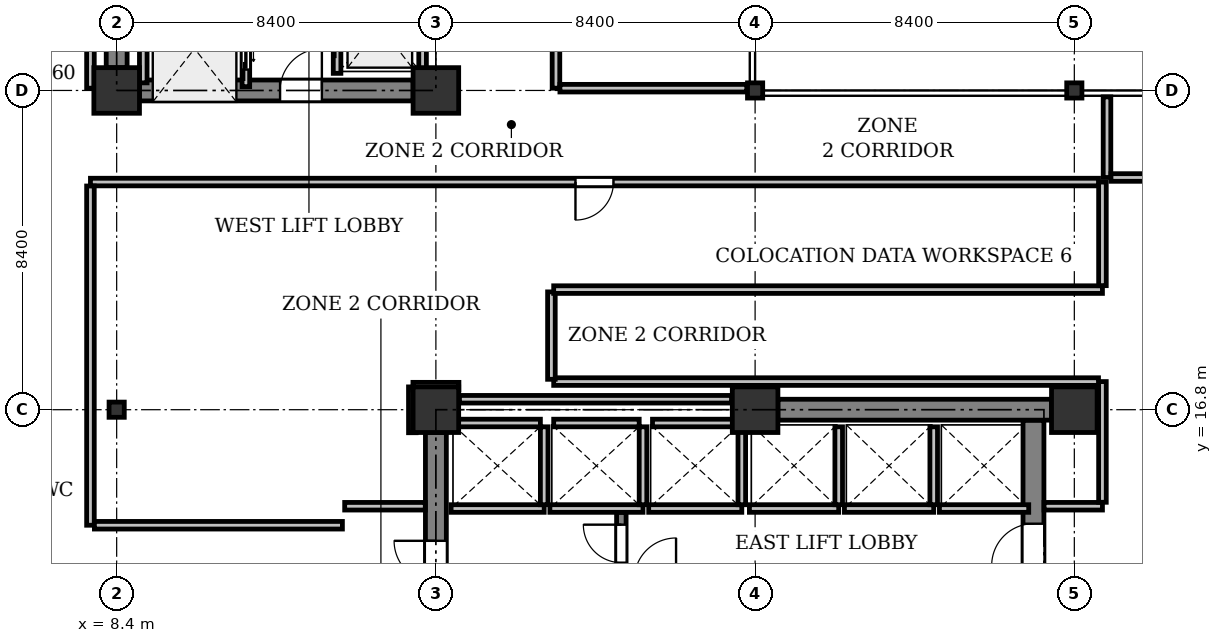
"""IFC4 building model, lengths in metres.
Left out: names, types, materials, properties, quantities, classifications, styles, units other than length and angle.
Written with IfcOpenShell. Run it as: python <this file> out.ifc"""

import sys

from ifc_helpers import new_model, si_unit, direction, frame, frame_2d, origin, origin_2d, place, context, subcontext, project, spatial, rectangle, i_section, extrude, element, fill, save


model = new_model("IFC4")
c1 = context("Model", 3, precision=1e-05, world=origin(), true_north=direction((0.0, 1.0)))
c2 = subcontext(c1, "Body", "Model", "MODEL_VIEW")
j1 = project(units=[si_unit("LENGTHUNIT", "METRE"), si_unit("PLANEANGLEUNIT", "RADIAN")], contexts=[c1])
p1 = place(None, origin())
s1 = spatial("IfcSite", under=j1, at=p1, CompositionType="ELEMENT")
p2 = place(p1, origin())
s2 = spatial("IfcBuilding", under=s1, at=p2, CompositionType="ELEMENT")
p3 = place(p2, frame((0.0, 0.0, 96.7)))
s3 = spatial("IfcBuildingStorey", under=s2, at=p3, CompositionType="ELEMENT", Elevation=96.7)
p4 = place(p3, frame((8.4, 16.8, 0.0), z_axis=(0.0, 0.0, 1.0), x_axis=(1.0, 0.0, 0.0)))
e1 = element("IfcColumn", 1, at=p4, inside=s3, PredefinedType="COLUMN", context=c2, shape_type="SweptSolid", body=[
    extrude(i_section(OverallWidth=0.4, OverallDepth=0.4, WebThickness=0.025, FlangeThickness=0.04, at=origin_2d()), origin(), (0.0, 0.0, 1.0), 4.1),
])
for number, where, z_axis, x_axis in (
    (2, (8.4, 25.2, 0.0), (0.0, 0.0, 1.0), (1.0, 0.0, 0.0)),
    (3, (16.8, 16.8, 0.0), (0.0, 0.0, 1.0), (1.0, 0.0, 0.0)),
    (4, (16.8, 25.2, 0.0), (0.0, 0.0, 1.0), (1.0, 0.0, 0.0)),
    (5, (25.2, 16.8, 0.0), (0.0, 0.0, 1.0), (1.0, 0.0, 0.0)),
):
    element("IfcColumn", number, at=place(p3, frame(where, z_axis=z_axis, x_axis=x_axis)), inside=s3, PredefinedType="COLUMN", context=c2, shape_type="SweptSolid", body=[
        extrude(rectangle(XDim=1.2, YDim=1.2, at=origin_2d()), origin(), (0.0, 0.0, 1.0), 4.1),
    ])
p5 = place(p3, frame((25.2, 25.2, 0.0), z_axis=(0.0, 0.0, 1.0), x_axis=(1.0, 0.0, 0.0)))
e6 = element("IfcColumn", 6, at=p5, inside=s3, PredefinedType="COLUMN", context=c2, shape_type="SweptSolid", body=[
    extrude(i_section(OverallWidth=0.4, OverallDepth=0.4, WebThickness=0.025, FlangeThickness=0.04, at=origin_2d()), origin(), (0.0, 0.0, 1.0), 4.1),
])
p6 = place(p3, frame((33.6, 16.8, 0.0), z_axis=(0.0, 0.0, 1.0), x_axis=(1.0, 0.0, 0.0)))
e7 = element("IfcColumn", 7, at=p6, inside=s3, PredefinedType="COLUMN", context=c2, shape_type="SweptSolid", body=[
    extrude(rectangle(XDim=1.2, YDim=1.2, at=origin_2d()), origin(), (0.0, 0.0, 1.0), 4.1),
])
p7 = place(p3, frame((33.6, 25.2, 0.0), z_axis=(0.0, 0.0, 1.0), x_axis=(1.0, 0.0, 0.0)))
e8 = element("IfcColumn", 8, at=p7, inside=s3, PredefinedType="COLUMN", context=c2, shape_type="SweptSolid", body=[
    extrude(i_section(OverallWidth=0.4, OverallDepth=0.4, WebThickness=0.025, FlangeThickness=0.04, at=origin_2d()), origin(), (0.0, 0.0, 1.0), 4.1),
])
p8 = place(p3, frame((8.4, 25.8, 0.0), z_axis=(0.0, 0.0, 1.0), x_axis=(0.0, 1.0, 0.0)))
e9 = element("IfcWall", 9, at=p8, inside=s3, PredefinedType="SHEAR", context=c2, shape_type="SweptSolid", body=[
    extrude(rectangle(XDim=7.2, YDim=0.55, at=frame_2d((3.6, 0.0))), origin(), (0.0, 0.0, 1.0), 3.825),
])
p9 = place(p3, frame((9.0, 25.2, 0.0), z_axis=(0.0, 0.0, 1.0), x_axis=(1.0, 0.0, 0.0)))
e10 = element("IfcWall", 10, at=p9, inside=s3, PredefinedType="SHEAR", context=c2, shape_type="SweptSolid", body=[
    extrude(rectangle(XDim=7.2, YDim=0.55, at=frame_2d((3.6, 0.0))), origin(), (0.0, 0.0, 1.0), 3.825),
])
p10 = place(p9, frame((3.7, 0.0, 0.0)))
e11 = element("IfcOpeningElement", 11, at=p10, cuts=e10, PredefinedType="OPENING", context=c2, shape_type="SweptSolid", body=[
    extrude(rectangle(XDim=1.1, YDim=2.15, at=frame_2d((0.55, 1.075))), frame((0.0, 0.285, 0.0), z_axis=(0.0, -1.0, 0.0), x_axis=(1.0, 0.0, 0.0)), (0.0, 0.0, 1.0), 0.57),
])
p11 = place(p3, frame((32.525, 8.675, 0.0), z_axis=(0.0, 0.0, 1.0), x_axis=(0.0, 1.0, 0.0)))
e12 = element("IfcWall", 12, at=p11, inside=s3, PredefinedType="SHEAR", context=c2, shape_type="SweptSolid", body=[
    extrude(rectangle(XDim=7.85, YDim=0.55, at=frame_2d((3.925, 0.0))), origin(), (0.0, 0.0, 1.0), 3.825),
])
p12 = place(p11, frame((4.025, 0.0, 0.0)))
e13 = element("IfcOpeningElement", 13, at=p12, cuts=e12, PredefinedType="OPENING", context=c2, shape_type="SweptSolid", body=[
    extrude(rectangle(XDim=1.1, YDim=2.15, at=frame_2d((0.55, 1.075))), frame((0.0, 0.285, 0.0), z_axis=(0.0, -1.0, 0.0), x_axis=(1.0, 0.0, 0.0)), (0.0, 0.0, 1.0), 0.57),
])
p13 = place(p3, frame((16.8, 9.0, 0.0), z_axis=(0.0, 0.0, 1.0), x_axis=(0.0, 1.0, 0.0)))
e14 = element("IfcWall", 14, at=p13, inside=s3, PredefinedType="SHEAR", context=c2, shape_type="SweptSolid", body=[
    extrude(rectangle(XDim=7.2, YDim=0.55, at=frame_2d((3.6, 0.0))), origin(), (0.0, 0.0, 1.0), 3.825),
])
p14 = place(p13, frame((3.25, 0.0, 0.0)))
e15 = element("IfcOpeningElement", 15, at=p14, cuts=e14, PredefinedType="OPENING", context=c2, shape_type="SweptSolid", body=[
    extrude(rectangle(XDim=1.1, YDim=2.15, at=frame_2d((0.55, 1.075))), frame((0.0, 0.285, 0.0), z_axis=(0.0, -1.0, 0.0), x_axis=(1.0, 0.0, 0.0)), (0.0, 0.0, 1.0), 0.57),
])
p15 = place(p3, frame((25.8, 16.8, 0.0), z_axis=(0.0, 0.0, 1.0), x_axis=(1.0, 0.0, 0.0)))
e16 = element("IfcWall", 16, at=p15, inside=s3, PredefinedType="SHEAR", context=c2, shape_type="SweptSolid", body=[
    extrude(rectangle(XDim=7.2, YDim=0.55, at=frame_2d((3.6, 0.0))), origin(), (0.0, 0.0, 1.0), 3.825),
])
p16 = place(p3, frame((21.68, 12.45, 0.0), z_axis=(0.0, 0.0, 1.0), x_axis=(0.0, 1.0, 0.0)))
e17 = element("IfcWall", 17, at=p16, inside=s3, PredefinedType="SHEAR", context=c2, shape_type="SweptSolid", body=[
    extrude(rectangle(XDim=1.65, YDim=0.25, at=frame_2d((0.825, 0.0))), origin(), (0.0, 0.0, 1.0), 3.825),
])
p17 = place(p16, frame((0.325, 0.0, 0.0)))
e18 = element("IfcOpeningElement", 18, at=p17, cuts=e17, PredefinedType="OPENING", context=c2, shape_type="SweptSolid", body=[
    extrude(rectangle(XDim=1.0, YDim=2.15, at=frame_2d((0.5, 1.075))), frame((0.0, 0.135, 0.0), z_axis=(0.0, -1.0, 0.0), x_axis=(1.0, 0.0, 0.0)), (0.0, 0.0, 1.0), 0.27),
])
p18 = place(p3, frame((11.8, 25.3, 0.0), z_axis=(0.0, 0.0, 1.0), x_axis=(0.0, 1.0, 0.0)))
e19 = element("IfcWall", 19, at=p18, inside=s3, PredefinedType="PARTITIONING", context=c2, shape_type="SweptSolid", body=[
    extrude(rectangle(XDim=2.0, YDim=0.2, at=frame_2d((1.0, 0.0))), origin(), (0.0, 0.0, 1.0), 3.825),
])
p19 = place(p18, frame((0.45, 0.0, 0.0)))
e20 = element("IfcOpeningElement", 20, at=p19, cuts=e19, PredefinedType="OPENING", context=c2, shape_type="SweptSolid", body=[
    extrude(rectangle(XDim=1.1, YDim=2.2, at=frame_2d((0.55, 1.1))), frame((0.0, 0.11, 0.0), z_axis=(0.0, -1.0, 0.0), x_axis=(1.0, 0.0, 0.0)), (0.0, 0.0, 1.0), 0.22),
])
p20 = place(p3, frame((9.1, 25.4, 0.0), z_axis=(0.0, 0.0, 1.0), x_axis=(0.0, 1.0, 0.0)))
e21 = element("IfcWall", 21, at=p20, inside=s3, PredefinedType="PARTITIONING", context=c2, shape_type="SweptSolid", body=[
    extrude(rectangle(XDim=1.8, YDim=0.2, at=frame_2d((0.9, 0.0))), origin(), (0.0, 0.0, 1.0), 3.825),
])
p21 = place(p3, frame((14.2, 25.65, 0.0), z_axis=(0.0, 0.0, 1.0), x_axis=(0.0, 1.0, 0.0)))
e22 = element("IfcWall", 22, at=p21, inside=s3, PredefinedType="PARTITIONING", context=c2, shape_type="SweptSolid", body=[
    extrude(rectangle(XDim=2.5, YDim=0.2, at=frame_2d((1.25, 0.0))), origin(), (0.0, 0.0, 1.0), 3.825),
])
p22 = place(p21, frame((0.7, 0.0, 0.0)))
e23 = element("IfcOpeningElement", 23, at=p22, cuts=e22, PredefinedType="OPENING", context=c2, shape_type="SweptSolid", body=[
    extrude(rectangle(XDim=1.1, YDim=2.2, at=frame_2d((0.55, 1.1))), frame((0.0, 0.11, 0.0), z_axis=(0.0, -1.0, 0.0), x_axis=(1.0, 0.0, 0.0)), (0.0, 0.0, 1.0), 0.22),
])
p23 = place(p3, frame((16.45, 25.75, 0.0), z_axis=(0.0, 0.0, 1.0), x_axis=(0.0, 1.0, 0.0)))
e24 = element("IfcWall", 24, at=p23, inside=s3, PredefinedType="PARTITIONING", context=c2, shape_type="SweptSolid", body=[
    extrude(rectangle(XDim=2.3, YDim=0.2, at=frame_2d((1.15, 0.0))), origin(), (0.0, 0.0, 1.0), 3.825),
])
p24 = place(p3, frame((17.2, 14.2, 0.0), z_axis=(0.0, 0.0, 1.0), x_axis=(1.0, 0.0, 0.0)))
e25 = element("IfcWall", 25, at=p24, inside=s3, PredefinedType="PARTITIONING", context=c2, shape_type="SweptSolid", body=[
    extrude(rectangle(XDim=2.45, YDim=0.2, at=frame_2d((1.225, 0.0))), origin(), (0.0, 0.0, 1.0), 3.825),
])
p25 = place(p3, frame((19.65, 14.3, 0.0), z_axis=(0.0, 0.0, 1.0), x_axis=(0.0, 1.0, 0.0)))
e26 = element("IfcWall", 26, at=p25, inside=s3, PredefinedType="PARTITIONING", context=c2, shape_type="SweptSolid", body=[
    extrude(rectangle(XDim=2.05, YDim=0.2, at=frame_2d((1.025, 0.0))), origin(), (0.0, 0.0, 1.0), 3.825),
])
p26 = place(p3, frame((17.3, 16.45, 0.0), z_axis=(0.0, 0.0, 1.0), x_axis=(1.0, 0.0, 0.0)))
e27 = element("IfcWall", 27, at=p26, inside=s3, PredefinedType="PARTITIONING", context=c2, shape_type="SweptSolid", body=[
    extrude(rectangle(XDim=2.25, YDim=0.2, at=frame_2d((1.125, 0.0))), origin(), (0.0, 0.0, 1.0), 3.825),
])
p27 = place(p3, frame((19.8, 14.2, 0.0), z_axis=(0.0, 0.0, 1.0), x_axis=(1.0, 0.0, 0.0)))
e28 = element("IfcWall", 28, at=p27, inside=s3, PredefinedType="PARTITIONING", context=c2, shape_type="SweptSolid", body=[
    extrude(rectangle(XDim=2.45, YDim=0.2, at=frame_2d((1.225, 0.0))), origin(), (0.0, 0.0, 1.0), 3.825),
])
p28 = place(p3, frame((22.25, 14.3, 0.0), z_axis=(0.0, 0.0, 1.0), x_axis=(0.0, 1.0, 0.0)))
e29 = element("IfcWall", 29, at=p28, inside=s3, PredefinedType="PARTITIONING", context=c2, shape_type="SweptSolid", body=[
    extrude(rectangle(XDim=2.05, YDim=0.2, at=frame_2d((1.025, 0.0))), origin(), (0.0, 0.0, 1.0), 3.825),
])
p29 = place(p3, frame((19.9, 16.45, 0.0), z_axis=(0.0, 0.0, 1.0), x_axis=(1.0, 0.0, 0.0)))
e30 = element("IfcWall", 30, at=p29, inside=s3, PredefinedType="PARTITIONING", context=c2, shape_type="SweptSolid", body=[
    extrude(rectangle(XDim=2.25, YDim=0.2, at=frame_2d((1.125, 0.0))), origin(), (0.0, 0.0, 1.0), 3.825),
])
p30 = place(p3, frame((22.4, 14.2, 0.0), z_axis=(0.0, 0.0, 1.0), x_axis=(1.0, 0.0, 0.0)))
e31 = element("IfcWall", 31, at=p30, inside=s3, PredefinedType="PARTITIONING", context=c2, shape_type="SweptSolid", body=[
    extrude(rectangle(XDim=2.45, YDim=0.2, at=frame_2d((1.225, 0.0))), origin(), (0.0, 0.0, 1.0), 3.825),
])
p31 = place(p3, frame((24.85, 14.3, 0.0), z_axis=(0.0, 0.0, 1.0), x_axis=(0.0, 1.0, 0.0)))
e32 = element("IfcWall", 32, at=p31, inside=s3, PredefinedType="PARTITIONING", context=c2, shape_type="SweptSolid", body=[
    extrude(rectangle(XDim=2.05, YDim=0.2, at=frame_2d((1.025, 0.0))), origin(), (0.0, 0.0, 1.0), 3.825),
])
p32 = place(p3, frame((22.5, 16.45, 0.0), z_axis=(0.0, 0.0, 1.0), x_axis=(1.0, 0.0, 0.0)))
e33 = element("IfcWall", 33, at=p32, inside=s3, PredefinedType="PARTITIONING", context=c2, shape_type="SweptSolid", body=[
    extrude(rectangle(XDim=2.25, YDim=0.2, at=frame_2d((1.125, 0.0))), origin(), (0.0, 0.0, 1.0), 3.825),
])
p33 = place(p3, frame((25.05, 14.2, 0.0), z_axis=(0.0, 0.0, 1.0), x_axis=(1.0, 0.0, 0.0)))
e34 = element("IfcWall", 34, at=p33, inside=s3, PredefinedType="PARTITIONING", context=c2, shape_type="SweptSolid", body=[
    extrude(rectangle(XDim=2.35, YDim=0.2, at=frame_2d((1.175, 0.0))), origin(), (0.0, 0.0, 1.0), 3.825),
])
p34 = place(p3, frame((27.4, 14.3, 0.0), z_axis=(0.0, 0.0, 1.0), x_axis=(0.0, 1.0, 0.0)))
e35 = element("IfcWall", 35, at=p34, inside=s3, PredefinedType="PARTITIONING", context=c2, shape_type="SweptSolid", body=[
    extrude(rectangle(XDim=2.05, YDim=0.2, at=frame_2d((1.025, 0.0))), origin(), (0.0, 0.0, 1.0), 3.825),
])
p35 = place(p3, frame((27.55, 14.2, 0.0), z_axis=(0.0, 0.0, 1.0), x_axis=(1.0, 0.0, 0.0)))
e36 = element("IfcWall", 36, at=p35, inside=s3, PredefinedType="PARTITIONING", context=c2, shape_type="SweptSolid", body=[
    extrude(rectangle(XDim=2.35, YDim=0.2, at=frame_2d((1.175, 0.0))), origin(), (0.0, 0.0, 1.0), 3.825),
])
p36 = place(p3, frame((29.9, 14.3, 0.0), z_axis=(0.0, 0.0, 1.0), x_axis=(0.0, 1.0, 0.0)))
e37 = element("IfcWall", 37, at=p36, inside=s3, PredefinedType="PARTITIONING", context=c2, shape_type="SweptSolid", body=[
    extrude(rectangle(XDim=2.05, YDim=0.2, at=frame_2d((1.025, 0.0))), origin(), (0.0, 0.0, 1.0), 3.825),
])
p37 = place(p3, frame((30.05, 14.2, 0.0), z_axis=(0.0, 0.0, 1.0), x_axis=(1.0, 0.0, 0.0)))
e38 = element("IfcWall", 38, at=p37, inside=s3, PredefinedType="PARTITIONING", context=c2, shape_type="SweptSolid", body=[
    extrude(rectangle(XDim=2.35, YDim=0.2, at=frame_2d((1.175, 0.0))), origin(), (0.0, 0.0, 1.0), 3.825),
])
p38 = place(p3, frame((32.804, 14.26, 0.0), z_axis=(0.0, 0.0, 1.0), x_axis=(1.0, 0.0, 0.0)))
e39 = element("IfcWall", 39, at=p38, inside=s3, PredefinedType="PARTITIONING", context=c2, shape_type="SweptSolid", body=[
    extrude(rectangle(XDim=1.536, YDim=0.2, at=frame_2d((0.768, 0.0))), origin(), (0.0, 0.0, 1.0), 3.297),
])
p39 = place(p3, frame((34.34, 14.364, 0.0), z_axis=(0.0, 0.0, 1.0), x_axis=(0.0, 1.0, 0.0)))
e40 = element("IfcWall", 40, at=p39, inside=s3, PredefinedType="PARTITIONING", context=c2, shape_type="SweptSolid", body=[
    extrude(rectangle(XDim=3.176, YDim=0.2, at=frame_2d((1.588, 0.0))), origin(), (0.0, 0.0, 1.0), 3.292),
])
p40 = place(p3, frame((34.236, 17.54, 0.0), z_axis=(0.0, 0.0, 1.0), x_axis=(-1.0, 0.0, 0.0)))
e41 = element("IfcWall", 41, at=p40, inside=s3, PredefinedType="PARTITIONING", context=c2, shape_type="SweptSolid", body=[
    extrude(rectangle(XDim=14.336, YDim=0.2, at=frame_2d((7.168, 0.0))), origin(), (0.0, 0.0, 1.0), 3.297),
])
p41 = place(p3, frame((19.84, 17.6, 0.0), z_axis=(0.0, 0.0, 1.0), x_axis=(0.0, 1.0, 0.0)))
e42 = element("IfcWall", 42, at=p41, inside=s3, PredefinedType="PARTITIONING", context=c2, shape_type="SweptSolid", body=[
    extrude(rectangle(XDim=2.3, YDim=0.2, at=frame_2d((1.15, 0.0))), origin(), (0.0, 0.0, 1.0), 3.825),
])
p42 = place(p3, frame((19.9, 19.96, 0.0), z_axis=(0.0, 0.0, 1.0), x_axis=(1.0, 0.0, 0.0)))
e43 = element("IfcWall", 43, at=p42, inside=s3, PredefinedType="PARTITIONING", context=c2, shape_type="SweptSolid", body=[
    extrude(rectangle(XDim=14.44, YDim=0.2, at=frame_2d((7.22, 0.0))), origin(), (0.0, 0.0, 1.0), 3.297),
])
p43 = place(p3, frame((34.34, 20.064, 0.0), z_axis=(0.0, 0.0, 1.0), x_axis=(0.0, 1.0, 0.0)))
e44 = element("IfcWall", 44, at=p43, inside=s3, PredefinedType="PARTITIONING", context=c2, shape_type="SweptSolid", body=[
    extrude(rectangle(XDim=2.726, YDim=0.2, at=frame_2d((1.363, 0.0))), origin(), (0.0, 0.0, 1.0), 3.825),
])
p44 = place(p3, frame((34.236, 22.79, 0.0), z_axis=(0.0, 0.0, 1.0), x_axis=(-1.0, 0.0, 0.0)))
e45 = element("IfcWall", 45, at=p44, inside=s3, PredefinedType="PARTITIONING", context=c2, shape_type="SweptSolid", body=[
    extrude(rectangle(XDim=26.526, YDim=0.2, at=frame_2d((13.263, 0.0))), origin(), (0.0, 0.0, 1.0), 3.297),
])
p45 = place(p44, frame((12.763, 0.0, 0.0)))
e46 = element("IfcOpeningElement", 46, at=p45, cuts=e45, PredefinedType="OPENING", context=c2, shape_type="SweptSolid", body=[
    extrude(rectangle(XDim=1.0, YDim=2.15, at=frame_2d((0.5, 1.075))), frame((0.0, 0.11, 0.0), z_axis=(0.0, -1.0, 0.0), x_axis=(1.0, 0.0, 0.0)), (0.0, 0.0, 1.0), 0.22),
])
p46 = place(p3, frame((7.71, 22.686, 0.0), z_axis=(0.0, 0.0, 1.0), x_axis=(0.0, -1.0, 0.0)))
e47 = element("IfcWall", 47, at=p46, inside=s3, PredefinedType="PARTITIONING", context=c2, shape_type="SweptSolid", body=[
    extrude(rectangle(XDim=8.926, YDim=0.2, at=frame_2d((4.463, 0.0))), origin(), (0.0, 0.0, 1.0), 3.292),
])
p47 = place(p3, frame((7.814, 13.76, 0.0), z_axis=(0.0, 0.0, 1.0), x_axis=(1.0, 0.0, 0.0)))
e48 = element("IfcWall", 48, at=p47, inside=s3, PredefinedType="PARTITIONING", context=c2, shape_type="SweptSolid", body=[
    extrude(rectangle(XDim=6.526, YDim=0.2, at=frame_2d((3.263, 0.0))), origin(), (0.0, 0.0, 1.0), 3.297),
])
p48 = place(p3, frame((14.4, 14.26, 0.0), z_axis=(0.0, 0.0, 1.0), x_axis=(1.0, 0.0, 0.0)))
e49 = element("IfcWall", 49, at=p48, inside=s3, PredefinedType="PARTITIONING", context=c2, shape_type="SweptSolid", body=[
    extrude(rectangle(XDim=2.121, YDim=0.2, at=frame_2d((1.061, 0.0))), origin(), (0.0, 0.0, 1.0), 3.825),
])
p49 = place(p3, frame((16.181, 16.194, 0.0), z_axis=(0.0, 0.0, 1.0), x_axis=(-0.000809880277, 0.999999672047, 0.0)))
e50 = element("IfcWall", 50, at=p49, inside=s3, PredefinedType="PARTITIONING", context=c2, shape_type="SweptSolid", body=[
    extrude(rectangle(XDim=1.206, YDim=0.2, at=frame_2d((0.603, 0.0))), origin(), (0.0, 0.0, 1.0), 3.292),
])
p50 = place(p3, frame((16.196, 17.42, 0.0), z_axis=(0.0, 0.0, 1.0), x_axis=(0.99999991854, -0.000403632661, 0.0)))
e51 = element("IfcWall", 51, at=p50, inside=s3, PredefinedType="PARTITIONING", context=c2, shape_type="SweptSolid", body=[
    extrude(rectangle(XDim=1.21, YDim=0.2, at=frame_2d((0.605, 0.0))), origin(), (0.0, 0.0, 1.0), 3.297),
])
p51 = place(p3, frame((17.42, 17.075, 0.0), z_axis=(0.0, 0.0, 1.0), x_axis=(1.0, 0.0, 0.0)))
e52 = element("IfcWall", 52, at=p51, inside=s3, PredefinedType="PARTITIONING", context=c2, shape_type="SweptSolid", body=[
    extrude(rectangle(XDim=7.16, YDim=0.2, at=frame_2d((3.58, 0.0))), origin(), (0.0, 0.0, 1.0), 3.469),
])
p52 = place(p3, frame((7.71, 43.0, 0.0), z_axis=(0.0, 0.0, 1.0), x_axis=(0.0, -1.0, 0.0)))
e53 = element("IfcWall", 53, at=p52, inside=s3, PredefinedType="PARTITIONING", context=c2, shape_type="SweptSolid", body=[
    extrude(rectangle(XDim=17.74, YDim=0.2, at=frame_2d((8.87, 0.0))), origin(), (0.0, 0.0, 1.0), 3.292),
])
p53 = place(p3, frame((19.96, 43.0, 0.0), z_axis=(0.0, 0.0, 1.0), x_axis=(0.0, -1.0, 0.0)))
e54 = element("IfcWall", 54, at=p53, inside=s3, PredefinedType="PARTITIONING", context=c2, shape_type="SweptSolid", body=[
    extrude(rectangle(XDim=17.74, YDim=0.2, at=frame_2d((8.87, 0.0))), origin(), (0.0, 0.0, 1.0), 3.292),
])
p54 = place(p53, frame((8.37, 0.0, 0.0)))
e55 = element("IfcOpeningElement", 55, at=p54, cuts=e54, PredefinedType="OPENING", context=c2, shape_type="SweptSolid", body=[
    extrude(rectangle(XDim=1.0, YDim=2.15, at=frame_2d((0.5, 1.075))), frame((0.0, 0.11, 0.0), z_axis=(0.0, -1.0, 0.0), x_axis=(1.0, 0.0, 0.0)), (0.0, 0.0, 1.0), 0.22),
])
p55 = place(p3, frame((20.064, 25.26, 0.0), z_axis=(0.0, 0.0, 1.0), x_axis=(1.0, 0.0, 0.0)))
e56 = element("IfcWall", 56, at=p55, inside=s3, PredefinedType="PARTITIONING", context=c2, shape_type="SweptSolid", body=[
    extrude(rectangle(XDim=4.916, YDim=0.2, at=frame_2d((2.458, 0.0))), origin(), (0.0, 0.0, 1.0), 3.292),
])
p56 = place(p3, frame((34.46, 25.031, 0.0), z_axis=(0.0, 0.0, 1.0), x_axis=(0.0, -1.0, 0.0)))
e57 = element("IfcWall", 57, at=p56, inside=s3, PredefinedType="PARTITIONING", context=c2, shape_type="SweptSolid", body=[
    extrude(rectangle(XDim=2.121, YDim=0.2, at=frame_2d((1.061, 0.0))), origin(), (0.0, 0.0, 1.0), 3.825),
])
p57 = place(p3, frame((34.564, 22.91, 0.0), z_axis=(0.0, 0.0, 1.0), x_axis=(1.0, 0.0, 0.0)))
e58 = element("IfcWall", 58, at=p57, inside=s3, PredefinedType="PARTITIONING", context=c2, shape_type="SweptSolid", body=[
    extrude(rectangle(XDim=2.086, YDim=0.2, at=frame_2d((1.043, 0.0))), origin(), (0.0, 0.0, 1.0), 3.825),
])
p58 = place(p10, origin())
e59 = element("IfcDoor", 59, at=p58, inside=s3, OperationType="SINGLE_SWING_RIGHT", PredefinedType="DOOR", context=c2, shape_type="SweptSolid", body=[
    extrude(rectangle(XDim=1.1, YDim=2.15, at=frame_2d((0.55, 1.075))), frame((0.0, 0.025, 0.0), z_axis=(0.0, -1.0, 0.0), x_axis=(1.0, 0.0, 0.0)), (0.0, 0.0, 1.0), 0.05),
])
fill(e11, e59)
p59 = place(p12, origin())
e60 = element("IfcDoor", 60, at=p59, inside=s3, OperationType="SINGLE_SWING_LEFT", PredefinedType="DOOR", context=c2, shape_type="SweptSolid", body=[
    extrude(rectangle(XDim=1.1, YDim=2.15, at=frame_2d((0.55, 1.075))), frame((0.0, 0.025, 0.0), z_axis=(0.0, -1.0, 0.0), x_axis=(1.0, 0.0, 0.0)), (0.0, 0.0, 1.0), 0.05),
])
fill(e13, e60)
p60 = place(p14, origin())
e61 = element("IfcDoor", 61, at=p60, inside=s3, OperationType="SINGLE_SWING_RIGHT", PredefinedType="DOOR", context=c2, shape_type="SweptSolid", body=[
    extrude(rectangle(XDim=1.1, YDim=2.15, at=frame_2d((0.55, 1.075))), frame((0.0, 0.025, 0.0), z_axis=(0.0, -1.0, 0.0), x_axis=(1.0, 0.0, 0.0)), (0.0, 0.0, 1.0), 0.05),
])
fill(e15, e61)
p61 = place(p17, origin())
e62 = element("IfcDoor", 62, at=p61, inside=s3, OperationType="SINGLE_SWING_RIGHT", PredefinedType="DOOR", context=c2, shape_type="SweptSolid", body=[
    extrude(rectangle(XDim=1.0, YDim=2.15, at=frame_2d((0.5, 1.075))), frame((0.0, 0.025, 0.0), z_axis=(0.0, -1.0, 0.0), x_axis=(1.0, 0.0, 0.0)), (0.0, 0.0, 1.0), 0.05),
])
fill(e18, e62)
p62 = place(p19, origin())
e63 = element("IfcDoor", 63, at=p62, inside=s3, OperationType="DOUBLE_DOOR_SLIDING", PredefinedType="DOOR", context=c2, shape_type="SweptSolid", body=[
    extrude(rectangle(XDim=1.1, YDim=2.2, at=frame_2d((0.55, 1.1))), frame((0.0, 0.025, 0.0), z_axis=(0.0, -1.0, 0.0), x_axis=(1.0, 0.0, 0.0)), (0.0, 0.0, 1.0), 0.05),
])
fill(e20, e63)
p63 = place(p45, origin())
e64 = element("IfcDoor", 64, at=p63, inside=s3, OperationType="SINGLE_SWING_RIGHT", PredefinedType="DOOR", context=c2, shape_type="SweptSolid", body=[
    extrude(rectangle(XDim=1.0, YDim=2.15, at=frame_2d((0.5, 1.075))), frame((0.0, 0.025, 0.0), z_axis=(0.0, -1.0, 0.0), x_axis=(1.0, 0.0, 0.0)), (0.0, 0.0, 1.0), 0.05),
])
fill(e46, e64)
save(model, sys.argv[1])
